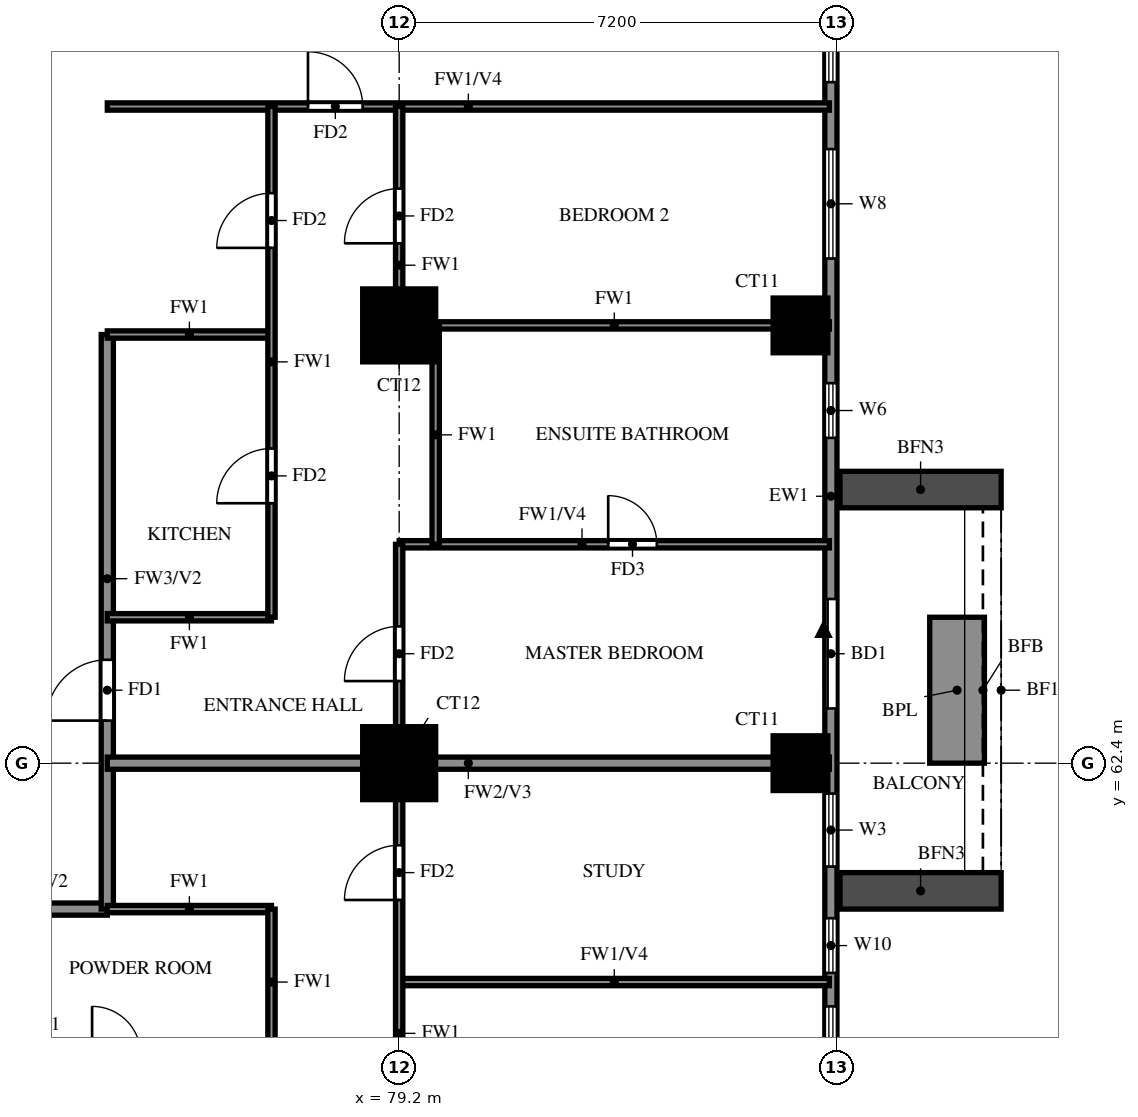
"""IFC4 building model, lengths in metres.
Left out: names, types, materials, properties, quantities, classifications, styles, units other than length and angle.
Written with IfcOpenShell. Run it as: python <this file> out.ifc"""

import sys

from ifc_helpers import new_model, si_unit, direction, frame, frame_2d, origin, origin_2d, place, context, subcontext, project, spatial, rectangle, extrude, source, transform, mapped, element, fill, save


model = new_model("IFC4")
c1 = context("Model", 3, precision=1e-05, world=origin(), true_north=direction((0.0, 1.0)))
c2 = subcontext(c1, "Body", "Model", "MODEL_VIEW")
j1 = project(units=[si_unit("LENGTHUNIT", "METRE"), si_unit("PLANEANGLEUNIT", "RADIAN")], contexts=[c1])
p1 = place(None, origin())
s1 = spatial("IfcSite", under=j1, at=p1, CompositionType="ELEMENT")
p2 = place(p1, origin())
s2 = spatial("IfcBuilding", under=s1, at=p2, CompositionType="ELEMENT")
p3 = place(p2, frame((0.0, 0.0, 100.5)))
s3 = spatial("IfcBuildingStorey", under=s2, at=p3, CompositionType="ELEMENT", Elevation=100.5)
m1 = source(origin(), c2, "Body", "SweptSolid", [
    extrude(rectangle(XDim=1.2, YDim=1.2, at=origin_2d()), origin(), (0.0, 0.0, 1.0), 3.18),
])
p4 = place(p3, frame((79.2, 62.4, 0.0), z_axis=(0.0, 0.0, 1.0), x_axis=(1.0, 0.0, 0.0)))
e1 = element("IfcColumn", 1, at=p4, inside=s3, PredefinedType="COLUMN", context=c2, shape_type="MappedRepresentation", body=[
    mapped(m1, transform((0.0, 0.0, 0.0))),
])
m2 = source(origin(), c2, "Body", "SweptSolid", [
    extrude(rectangle(XDim=0.9, YDim=0.9, at=origin_2d()), origin(), (0.0, 0.0, 1.0), 3.18),
])
p5 = place(p3, frame((85.8, 62.4, 0.0), z_axis=(0.0, 0.0, 1.0), x_axis=(1.0, 0.0, 0.0)))
e2 = element("IfcColumn", 2, at=p5, inside=s3, PredefinedType="COLUMN", context=c2, shape_type="MappedRepresentation", body=[
    mapped(m2, transform((0.0, 0.0, 0.0))),
])
p6 = place(p3, frame((79.2, 69.6, 0.0), z_axis=(0.0, 0.0, 1.0), x_axis=(1.0, 0.0, 0.0)))
e3 = element("IfcColumn", 3, at=p6, inside=s3, PredefinedType="COLUMN", context=c2, shape_type="MappedRepresentation", body=[
    mapped(m1, transform((0.0, 0.0, 0.0))),
])
p7 = place(p3, frame((85.8, 69.6, 0.0), z_axis=(0.0, 0.0, 1.0), x_axis=(1.0, 0.0, 0.0)))
e4 = element("IfcColumn", 4, at=p7, inside=s3, PredefinedType="COLUMN", context=c2, shape_type="MappedRepresentation", body=[
    mapped(m2, transform((0.0, 0.0, 0.0))),
])
p8 = place(p3, frame((86.3, 48.2, 0.0), z_axis=(0.0, 0.0, 1.0), x_axis=(0.0, 1.0, 0.0)))
e5 = element("IfcWall", 5, at=p8, inside=s3, PredefinedType="SOLIDWALL", context=c2, shape_type="SweptSolid", body=[
    extrude(rectangle(XDim=28.6, YDim=0.2, at=frame_2d((14.3, 0.0))), origin(), (0.0, 0.0, 1.0), 3.18),
])
p9 = place(p8, frame((15.1, 0.0, 0.0)))
e6 = element("IfcOpeningElement", 6, at=p9, cuts=e5, PredefinedType="OPENING", context=c2, shape_type="SweptSolid", body=[
    extrude(rectangle(XDim=1.8, YDim=2.4, at=frame_2d((0.9, 1.2))), frame((0.0, 0.11, 0.0), z_axis=(0.0, -1.0, 0.0), x_axis=(1.0, 0.0, 0.0)), (0.0, 0.0, 1.0), 0.22),
])
p10 = place(p8, frame((0.6, 0.0, 0.6)))
e7 = element("IfcOpeningElement", 7, at=p10, cuts=e5, PredefinedType="OPENING", context=c2, shape_type="SweptSolid", body=[
    extrude(rectangle(XDim=2.4, YDim=2.4, at=frame_2d((1.2, 1.2))), frame((0.0, 0.11, 0.0), z_axis=(0.0, -1.0, 0.0), x_axis=(1.0, 0.0, 0.0)), (0.0, 0.0, 1.0), 0.22),
])
p11 = place(p8, frame((3.8, 0.0, 0.6)))
e8 = element("IfcOpeningElement", 8, at=p11, cuts=e5, PredefinedType="OPENING", context=c2, shape_type="SweptSolid", body=[
    extrude(rectangle(XDim=2.4, YDim=2.4, at=frame_2d((1.2, 1.2))), frame((0.0, 0.11, 0.0), z_axis=(0.0, -1.0, 0.0), x_axis=(1.0, 0.0, 0.0)), (0.0, 0.0, 1.0), 0.22),
])
p12 = place(p8, frame((7.8, 0.0, 0.6)))
e9 = element("IfcOpeningElement", 9, at=p12, cuts=e5, PredefinedType="OPENING", context=c2, shape_type="SweptSolid", body=[
    extrude(rectangle(XDim=2.4, YDim=2.4, at=frame_2d((1.2, 1.2))), frame((0.0, 0.11, 0.0), z_axis=(0.0, -1.0, 0.0), x_axis=(1.0, 0.0, 0.0)), (0.0, 0.0, 1.0), 0.22),
])
p13 = place(p8, frame((10.75, 0.0, 0.6)))
e10 = element("IfcOpeningElement", 10, at=p13, cuts=e5, PredefinedType="OPENING", context=c2, shape_type="SweptSolid", body=[
    extrude(rectangle(XDim=0.9, YDim=2.4, at=frame_2d((0.45, 1.2))), frame((0.0, 0.11, 0.0), z_axis=(0.0, -1.0, 0.0), x_axis=(1.0, 0.0, 0.0)), (0.0, 0.0, 1.0), 0.22),
])
p14 = place(p8, frame((12.5, 0.0, 0.6)))
e11 = element("IfcOpeningElement", 11, at=p14, cuts=e5, PredefinedType="OPENING", context=c2, shape_type="SweptSolid", body=[
    extrude(rectangle(XDim=1.2, YDim=2.4, at=frame_2d((0.6, 1.2))), frame((0.0, 0.11, 0.0), z_axis=(0.0, -1.0, 0.0), x_axis=(1.0, 0.0, 0.0)), (0.0, 0.0, 1.0), 0.22),
])
p15 = place(p8, frame((19.55, 0.0, 1.5)))
e12 = element("IfcOpeningElement", 12, at=p15, cuts=e5, PredefinedType="OPENING", context=c2, shape_type="SweptSolid", body=[
    extrude(rectangle(XDim=0.9, YDim=0.9, at=frame_2d((0.45, 0.45))), frame((0.0, 0.11, 0.0), z_axis=(0.0, -1.0, 0.0), x_axis=(1.0, 0.0, 0.0)), (0.0, 0.0, 1.0), 0.22),
])
p16 = place(p8, frame((22.5, 0.0, 0.6)))
e13 = element("IfcOpeningElement", 13, at=p16, cuts=e5, PredefinedType="OPENING", context=c2, shape_type="SweptSolid", body=[
    extrude(rectangle(XDim=1.8, YDim=2.4, at=frame_2d((0.9, 1.2))), frame((0.0, 0.11, 0.0), z_axis=(0.0, -1.0, 0.0), x_axis=(1.0, 0.0, 0.0)), (0.0, 0.0, 1.0), 0.22),
])
p17 = place(p8, frame((25.4, 0.0, 0.6)))
e14 = element("IfcOpeningElement", 14, at=p17, cuts=e5, PredefinedType="OPENING", context=c2, shape_type="SweptSolid", body=[
    extrude(rectangle(XDim=2.4, YDim=2.4, at=frame_2d((1.2, 1.2))), frame((0.0, 0.11, 0.0), z_axis=(0.0, -1.0, 0.0), x_axis=(1.0, 0.0, 0.0)), (0.0, 0.0, 1.0), 0.22),
])
for number, where, z_axis, x_axis in (
    (15, (86.45, 60.3, 0.0), (0.0, 0.0, 1.0), (1.0, 0.0, 0.0)),
    (16, (86.45, 66.9, 0.0), (0.0, 0.0, 1.0), (1.0, 0.0, 0.0)),
):
    element("IfcWall", number, at=place(p3, frame(where, z_axis=z_axis, x_axis=x_axis)), inside=s3, PredefinedType="SOLIDWALL", context=c2, shape_type="SweptSolid", body=[
        extrude(rectangle(XDim=2.65, YDim=0.6, at=frame_2d((1.325, 0.0))), origin(), (0.0, 0.0, 1.0), 2.85),
    ])
p18 = place(p3, frame((88.375, 62.4, 0.0), z_axis=(0.0, 0.0, 1.0), x_axis=(0.0, 1.0, 0.0)))
e17 = element("IfcWall", 17, at=p18, inside=s3, PredefinedType="SOLIDWALL", context=c2, shape_type="SweptSolid", body=[
    extrude(rectangle(XDim=2.4, YDim=0.9, at=frame_2d((1.2, 0.0))), origin(), (0.0, 0.0, 1.0), 0.9),
])
p19 = place(p3, frame((72.0, 60.0, 0.0), z_axis=(0.0, 0.0, 1.0), x_axis=(1.0, 0.0, 0.0)))
e18 = element("IfcWall", 18, at=p19, inside=s3, PredefinedType="SOLIDWALL", context=c2, shape_type="SweptSolid", body=[
    extrude(rectangle(XDim=2.4, YDim=0.2, at=frame_2d((1.2, 0.0))), origin(), (0.0, 0.0, 1.0), 3.18),
])
p20 = place(p3, frame((74.4, 60.0, 0.0), z_axis=(0.0, 0.0, 1.0), x_axis=(0.0, 1.0, 0.0)))
e19 = element("IfcWall", 19, at=p20, inside=s3, PredefinedType="SOLIDWALL", context=c2, shape_type="SweptSolid", body=[
    extrude(rectangle(XDim=9.45, YDim=0.2, at=frame_2d((4.725, 0.0))), origin(), (0.0, 0.0, 1.0), 3.18),
])
p21 = place(p20, frame((3.1, 0.0, 0.0)))
e20 = element("IfcOpeningElement", 20, at=p21, cuts=e19, PredefinedType="OPENING", context=c2, shape_type="SweptSolid", body=[
    extrude(rectangle(XDim=1.0, YDim=2.1, at=frame_2d((0.5, 1.05))), frame((0.0, 0.11, 0.0), z_axis=(0.0, -1.0, 0.0), x_axis=(1.0, 0.0, 0.0)), (0.0, 0.0, 1.0), 0.22),
])
p22 = place(p3, frame((74.4, 62.4, 0.0), z_axis=(0.0, 0.0, 1.0), x_axis=(1.0, 0.0, 0.0)))
e21 = element("IfcWall", 21, at=p22, inside=s3, PredefinedType="SOLIDWALL", context=c2, shape_type="SweptSolid", body=[
    extrude(rectangle(XDim=11.875, YDim=0.2, at=frame_2d((5.938, 0.0))), origin(), (0.0, 0.0, 1.0), 3.18),
])
p23 = place(p3, frame((79.2, 58.8, 0.0), z_axis=(0.0, 0.0, 1.0), x_axis=(1.0, 0.0, 0.0)))
e22 = element("IfcWall", 22, at=p23, inside=s3, PredefinedType="PARTITIONING", context=c2, shape_type="SweptSolid", body=[
    extrude(rectangle(XDim=7.075, YDim=0.12, at=frame_2d((3.538, 0.0))), origin(), (0.0, 0.0, 1.0), 2.28),
])
for number, where, z_axis, x_axis in (
    (23, (74.4, 60.0, 0.0), (0.0, 0.0, 1.0), (1.0, 0.0, 0.0)),
    (24, (74.4, 64.8, 0.0), (0.0, 0.0, 1.0), (1.0, 0.0, 0.0)),
):
    element("IfcWall", number, at=place(p3, frame(where, z_axis=z_axis, x_axis=x_axis)), inside=s3, PredefinedType="PARTITIONING", context=c2, shape_type="SweptSolid", body=[
        extrude(rectangle(XDim=2.7, YDim=0.12, at=frame_2d((1.35, 0.0))), origin(), (0.0, 0.0, 1.0), 3.18),
    ])
p24 = place(p3, frame((79.2, 66.0, 0.0), z_axis=(0.0, 0.0, 1.0), x_axis=(1.0, 0.0, 0.0)))
e25 = element("IfcWall", 25, at=p24, inside=s3, PredefinedType="PARTITIONING", context=c2, shape_type="SweptSolid", body=[
    extrude(rectangle(XDim=7.075, YDim=0.12, at=frame_2d((3.538, 0.0))), origin(), (0.0, 0.0, 1.0), 2.28),
])
p25 = place(p24, frame((3.438, 0.0, 0.0)))
e26 = element("IfcOpeningElement", 26, at=p25, cuts=e25, PredefinedType="OPENING", context=c2, shape_type="SweptSolid", body=[
    extrude(rectangle(XDim=0.8, YDim=2.1, at=frame_2d((0.4, 1.05))), frame((0.0, 0.07, 0.0), z_axis=(0.0, -1.0, 0.0), x_axis=(1.0, 0.0, 0.0)), (0.0, 0.0, 1.0), 0.14),
])
p26 = place(p3, frame((74.4, 69.45, 0.0), z_axis=(0.0, 0.0, 1.0), x_axis=(1.0, 0.0, 0.0)))
e27 = element("IfcWall", 27, at=p26, inside=s3, PredefinedType="PARTITIONING", context=c2, shape_type="SweptSolid", body=[
    extrude(rectangle(XDim=2.7, YDim=0.12, at=frame_2d((1.35, 0.0))), origin(), (0.0, 0.0, 1.0), 3.18),
])
p27 = place(p3, frame((79.2, 69.6, 0.0), z_axis=(0.0, 0.0, 1.0), x_axis=(1.0, 0.0, 0.0)))
e28 = element("IfcWall", 28, at=p27, inside=s3, PredefinedType="PARTITIONING", context=c2, shape_type="SweptSolid", body=[
    extrude(rectangle(XDim=7.075, YDim=0.12, at=frame_2d((3.538, 0.0))), origin(), (0.0, 0.0, 1.0), 3.18),
])
p28 = place(p3, frame((74.4, 73.2, 0.0), z_axis=(0.0, 0.0, 1.0), x_axis=(1.0, 0.0, 0.0)))
e29 = element("IfcWall", 29, at=p28, inside=s3, PredefinedType="PARTITIONING", context=c2, shape_type="SweptSolid", body=[
    extrude(rectangle(XDim=11.875, YDim=0.12, at=frame_2d((5.938, 0.0))), origin(), (0.0, 0.0, 1.0), 2.28),
])
p29 = place(p28, frame((3.3, 0.0, 0.0)))
e30 = element("IfcOpeningElement", 30, at=p29, cuts=e29, PredefinedType="OPENING", context=c2, shape_type="SweptSolid", body=[
    extrude(rectangle(XDim=0.9, YDim=2.1, at=frame_2d((0.45, 1.05))), frame((0.0, 0.07, 0.0), z_axis=(0.0, -1.0, 0.0), x_axis=(1.0, 0.0, 0.0)), (0.0, 0.0, 1.0), 0.14),
])
p30 = place(p3, frame((77.1, 57.6, 0.0), z_axis=(0.0, 0.0, 1.0), x_axis=(0.0, 1.0, 0.0)))
e31 = element("IfcWall", 31, at=p30, inside=s3, PredefinedType="PARTITIONING", context=c2, shape_type="SweptSolid", body=[
    extrude(rectangle(XDim=2.4, YDim=0.12, at=frame_2d((1.2, 0.0))), origin(), (0.0, 0.0, 1.0), 3.18),
])
p31 = place(p3, frame((77.1, 64.8, 0.0), z_axis=(0.0, 0.0, 1.0), x_axis=(0.0, 1.0, 0.0)))
e32 = element("IfcWall", 32, at=p31, inside=s3, PredefinedType="PARTITIONING", context=c2, shape_type="SweptSolid", body=[
    extrude(rectangle(XDim=8.4, YDim=0.12, at=frame_2d((4.2, 0.0))), origin(), (0.0, 0.0, 1.0), 3.18),
])
p32 = place(p31, frame((1.875, 0.0, 0.0)))
e33 = element("IfcOpeningElement", 33, at=p32, cuts=e32, PredefinedType="OPENING", context=c2, shape_type="SweptSolid", body=[
    extrude(rectangle(XDim=0.9, YDim=2.1, at=frame_2d((0.45, 1.05))), frame((0.0, 0.07, 0.0), z_axis=(0.0, -1.0, 0.0), x_axis=(1.0, 0.0, 0.0)), (0.0, 0.0, 1.0), 0.14),
])
p33 = place(p31, frame((6.075, 0.0, 0.0)))
e34 = element("IfcOpeningElement", 34, at=p33, cuts=e32, PredefinedType="OPENING", context=c2, shape_type="SweptSolid", body=[
    extrude(rectangle(XDim=0.9, YDim=2.1, at=frame_2d((0.45, 1.05))), frame((0.0, 0.07, 0.0), z_axis=(0.0, -1.0, 0.0), x_axis=(1.0, 0.0, 0.0)), (0.0, 0.0, 1.0), 0.14),
])
p34 = place(p3, frame((79.2, 48.125, 0.0), z_axis=(0.0, 0.0, 1.0), x_axis=(0.0, 1.0, 0.0)))
e35 = element("IfcWall", 35, at=p34, inside=s3, PredefinedType="PARTITIONING", context=c2, shape_type="SweptSolid", body=[
    extrude(rectangle(XDim=17.875, YDim=0.12, at=frame_2d((8.938, 0.0))), origin(), (0.0, 0.0, 1.0), 3.18),
])
p35 = place(p34, frame((1.288, 0.0, 0.0)))
e36 = element("IfcOpeningElement", 36, at=p35, cuts=e35, PredefinedType="OPENING", context=c2, shape_type="SweptSolid", body=[
    extrude(rectangle(XDim=0.9, YDim=2.1, at=frame_2d((0.45, 1.05))), frame((0.0, 0.07, 0.0), z_axis=(0.0, -1.0, 0.0), x_axis=(1.0, 0.0, 0.0)), (0.0, 0.0, 1.0), 0.14),
])
p36 = place(p34, frame((7.825, 0.0, 0.0)))
e37 = element("IfcOpeningElement", 37, at=p36, cuts=e35, PredefinedType="OPENING", context=c2, shape_type="SweptSolid", body=[
    extrude(rectangle(XDim=1.5, YDim=2.1, at=frame_2d((0.75, 1.05))), frame((0.0, 0.07, 0.0), z_axis=(0.0, -1.0, 0.0), x_axis=(1.0, 0.0, 0.0)), (0.0, 0.0, 1.0), 0.14),
])
p37 = place(p34, frame((12.025, 0.0, 0.0)))
e38 = element("IfcOpeningElement", 38, at=p37, cuts=e35, PredefinedType="OPENING", context=c2, shape_type="SweptSolid", body=[
    extrude(rectangle(XDim=0.9, YDim=2.1, at=frame_2d((0.45, 1.05))), frame((0.0, 0.07, 0.0), z_axis=(0.0, -1.0, 0.0), x_axis=(1.0, 0.0, 0.0)), (0.0, 0.0, 1.0), 0.14),
])
p38 = place(p34, frame((15.625, 0.0, 0.0)))
e39 = element("IfcOpeningElement", 39, at=p38, cuts=e35, PredefinedType="OPENING", context=c2, shape_type="SweptSolid", body=[
    extrude(rectangle(XDim=0.9, YDim=2.1, at=frame_2d((0.45, 1.05))), frame((0.0, 0.07, 0.0), z_axis=(0.0, -1.0, 0.0), x_axis=(1.0, 0.0, 0.0)), (0.0, 0.0, 1.0), 0.14),
])
p39 = place(p3, frame((79.2, 69.6, 0.0), z_axis=(0.0, 0.0, 1.0), x_axis=(0.0, 1.0, 0.0)))
e40 = element("IfcWall", 40, at=p39, inside=s3, PredefinedType="PARTITIONING", context=c2, shape_type="SweptSolid", body=[
    extrude(rectangle(XDim=3.6, YDim=0.12, at=frame_2d((1.8, 0.0))), origin(), (0.0, 0.0, 1.0), 3.18),
])
p40 = place(p39, frame((1.35, 0.0, 0.0)))
e41 = element("IfcOpeningElement", 41, at=p40, cuts=e40, PredefinedType="OPENING", context=c2, shape_type="SweptSolid", body=[
    extrude(rectangle(XDim=0.9, YDim=2.1, at=frame_2d((0.45, 1.05))), frame((0.0, 0.07, 0.0), z_axis=(0.0, -1.0, 0.0), x_axis=(1.0, 0.0, 0.0)), (0.0, 0.0, 1.0), 0.14),
])
p41 = place(p3, frame((79.8, 66.0, 0.0), z_axis=(0.0, 0.0, 1.0), x_axis=(0.0, 1.0, 0.0)))
e42 = element("IfcWall", 42, at=p41, inside=s3, PredefinedType="PARTITIONING", context=c2, shape_type="SweptSolid", body=[
    extrude(rectangle(XDim=3.6, YDim=0.12, at=frame_2d((1.8, 0.0))), origin(), (0.0, 0.0, 1.0), 3.18),
])
p42 = place(p9, origin())
e43 = element("IfcDoor", 43, at=p42, inside=s3, OperationType="DOUBLE_DOOR_SLIDING", PredefinedType="DOOR", context=c2, shape_type="SweptSolid", body=[
    extrude(rectangle(XDim=1.8, YDim=2.4, at=frame_2d((0.9, 1.2))), frame((0.0, 0.025, 0.0), z_axis=(0.0, -1.0, 0.0), x_axis=(1.0, 0.0, 0.0)), (0.0, 0.0, 1.0), 0.05),
])
fill(e6, e43)
p43 = place(p12, origin())
e44 = element("IfcWindow", 44, at=p43, inside=s3, PartitioningType="DOUBLE_PANEL_VERTICAL", PredefinedType="WINDOW", context=c2, shape_type="SweptSolid", body=[
    extrude(rectangle(XDim=2.4, YDim=2.4, at=frame_2d((1.2, 1.2))), frame((0.0, 0.03, 0.0), z_axis=(0.0, -1.0, 0.0), x_axis=(1.0, 0.0, 0.0)), (0.0, 0.0, 1.0), 0.06),
])
fill(e9, e44)
p44 = place(p13, origin())
e45 = element("IfcWindow", 45, at=p44, inside=s3, PartitioningType="SINGLE_PANEL", PredefinedType="WINDOW", context=c2, shape_type="SweptSolid", body=[
    extrude(rectangle(XDim=0.9, YDim=2.4, at=frame_2d((0.45, 1.2))), frame((0.0, 0.03, 0.0), z_axis=(0.0, -1.0, 0.0), x_axis=(1.0, 0.0, 0.0)), (0.0, 0.0, 1.0), 0.06),
])
fill(e10, e45)
p45 = place(p14, origin())
e46 = element("IfcWindow", 46, at=p45, inside=s3, PartitioningType="SINGLE_PANEL", PredefinedType="WINDOW", context=c2, shape_type="SweptSolid", body=[
    extrude(rectangle(XDim=1.2, YDim=2.4, at=frame_2d((0.6, 1.2))), frame((0.0, 0.03, 0.0), z_axis=(0.0, -1.0, 0.0), x_axis=(1.0, 0.0, 0.0)), (0.0, 0.0, 1.0), 0.06),
])
fill(e11, e46)
p46 = place(p15, origin())
e47 = element("IfcWindow", 47, at=p46, inside=s3, PartitioningType="SINGLE_PANEL", PredefinedType="WINDOW", context=c2, shape_type="SweptSolid", body=[
    extrude(rectangle(XDim=0.9, YDim=0.9, at=frame_2d((0.45, 0.45))), frame((0.0, 0.03, 0.0), z_axis=(0.0, -1.0, 0.0), x_axis=(1.0, 0.0, 0.0)), (0.0, 0.0, 1.0), 0.06),
])
fill(e12, e47)
p47 = place(p16, origin())
e48 = element("IfcWindow", 48, at=p47, inside=s3, PartitioningType="DOUBLE_PANEL_VERTICAL", PredefinedType="WINDOW", context=c2, shape_type="SweptSolid", body=[
    extrude(rectangle(XDim=1.8, YDim=2.4, at=frame_2d((0.9, 1.2))), frame((0.0, 0.03, 0.0), z_axis=(0.0, -1.0, 0.0), x_axis=(1.0, 0.0, 0.0)), (0.0, 0.0, 1.0), 0.06),
])
fill(e13, e48)
p48 = place(p17, origin())
e49 = element("IfcWindow", 49, at=p48, inside=s3, PartitioningType="DOUBLE_PANEL_VERTICAL", PredefinedType="WINDOW", context=c2, shape_type="SweptSolid", body=[
    extrude(rectangle(XDim=2.4, YDim=2.4, at=frame_2d((1.2, 1.2))), frame((0.0, 0.03, 0.0), z_axis=(0.0, -1.0, 0.0), x_axis=(1.0, 0.0, 0.0)), (0.0, 0.0, 1.0), 0.06),
])
fill(e14, e49)
p49 = place(p37, origin())
e50 = element("IfcDoor", 50, at=p49, inside=s3, OperationType="SINGLE_SWING_RIGHT", PredefinedType="DOOR", context=c2, shape_type="SweptSolid", body=[
    extrude(rectangle(XDim=0.9, YDim=2.1, at=frame_2d((0.45, 1.05))), frame((0.0, 0.025, 0.0), z_axis=(0.0, -1.0, 0.0), x_axis=(1.0, 0.0, 0.0)), (0.0, 0.0, 1.0), 0.05),
])
fill(e38, e50)
p50 = place(p21, origin())
e51 = element("IfcDoor", 51, at=p50, inside=s3, OperationType="SINGLE_SWING_RIGHT", PredefinedType="DOOR", context=c2, shape_type="SweptSolid", body=[
    extrude(rectangle(XDim=1.0, YDim=2.1, at=frame_2d((0.5, 1.05))), frame((0.0, 0.025, 0.0), z_axis=(0.0, -1.0, 0.0), x_axis=(1.0, 0.0, 0.0)), (0.0, 0.0, 1.0), 0.05),
])
fill(e20, e51)
p51 = place(p38, origin())
e52 = element("IfcDoor", 52, at=p51, inside=s3, OperationType="SINGLE_SWING_LEFT", PredefinedType="DOOR", context=c2, shape_type="SweptSolid", body=[
    extrude(rectangle(XDim=0.9, YDim=2.1, at=frame_2d((0.45, 1.05))), frame((0.0, 0.025, 0.0), z_axis=(0.0, -1.0, 0.0), x_axis=(1.0, 0.0, 0.0)), (0.0, 0.0, 1.0), 0.05),
])
fill(e39, e52)
p52 = place(p25, origin())
e53 = element("IfcDoor", 53, at=p52, inside=s3, OperationType="SINGLE_SWING_LEFT", PredefinedType="DOOR", context=c2, shape_type="SweptSolid", body=[
    extrude(rectangle(XDim=0.8, YDim=2.1, at=frame_2d((0.4, 1.05))), frame((0.0, 0.025, 0.0), z_axis=(0.0, -1.0, 0.0), x_axis=(1.0, 0.0, 0.0)), (0.0, 0.0, 1.0), 0.05),
])
fill(e26, e53)
p53 = place(p40, origin())
e54 = element("IfcDoor", 54, at=p53, inside=s3, OperationType="SINGLE_SWING_RIGHT", PredefinedType="DOOR", context=c2, shape_type="SweptSolid", body=[
    extrude(rectangle(XDim=0.9, YDim=2.1, at=frame_2d((0.45, 1.05))), frame((0.0, 0.025, 0.0), z_axis=(0.0, -1.0, 0.0), x_axis=(1.0, 0.0, 0.0)), (0.0, 0.0, 1.0), 0.05),
])
fill(e41, e54)
p54 = place(p29, origin())
e55 = element("IfcDoor", 55, at=p54, inside=s3, OperationType="SINGLE_SWING_LEFT", PredefinedType="DOOR", context=c2, shape_type="SweptSolid", body=[
    extrude(rectangle(XDim=0.9, YDim=2.1, at=frame_2d((0.45, 1.05))), frame((0.0, 0.025, 0.0), z_axis=(0.0, -1.0, 0.0), x_axis=(1.0, 0.0, 0.0)), (0.0, 0.0, 1.0), 0.05),
])
fill(e30, e55)
p55 = place(p32, origin())
e56 = element("IfcDoor", 56, at=p55, inside=s3, OperationType="SINGLE_SWING_LEFT", PredefinedType="DOOR", context=c2, shape_type="SweptSolid", body=[
    extrude(rectangle(XDim=0.9, YDim=2.1, at=frame_2d((0.45, 1.05))), frame((0.0, 0.025, 0.0), z_axis=(0.0, -1.0, 0.0), x_axis=(1.0, 0.0, 0.0)), (0.0, 0.0, 1.0), 0.05),
])
fill(e33, e56)
p56 = place(p33, origin())
e57 = element("IfcDoor", 57, at=p56, inside=s3, OperationType="SINGLE_SWING_RIGHT", PredefinedType="DOOR", context=c2, shape_type="SweptSolid", body=[
    extrude(rectangle(XDim=0.9, YDim=2.1, at=frame_2d((0.45, 1.05))), frame((0.0, 0.025, 0.0), z_axis=(0.0, -1.0, 0.0), x_axis=(1.0, 0.0, 0.0)), (0.0, 0.0, 1.0), 0.05),
])
fill(e34, e57)
save(model, sys.argv[1])
